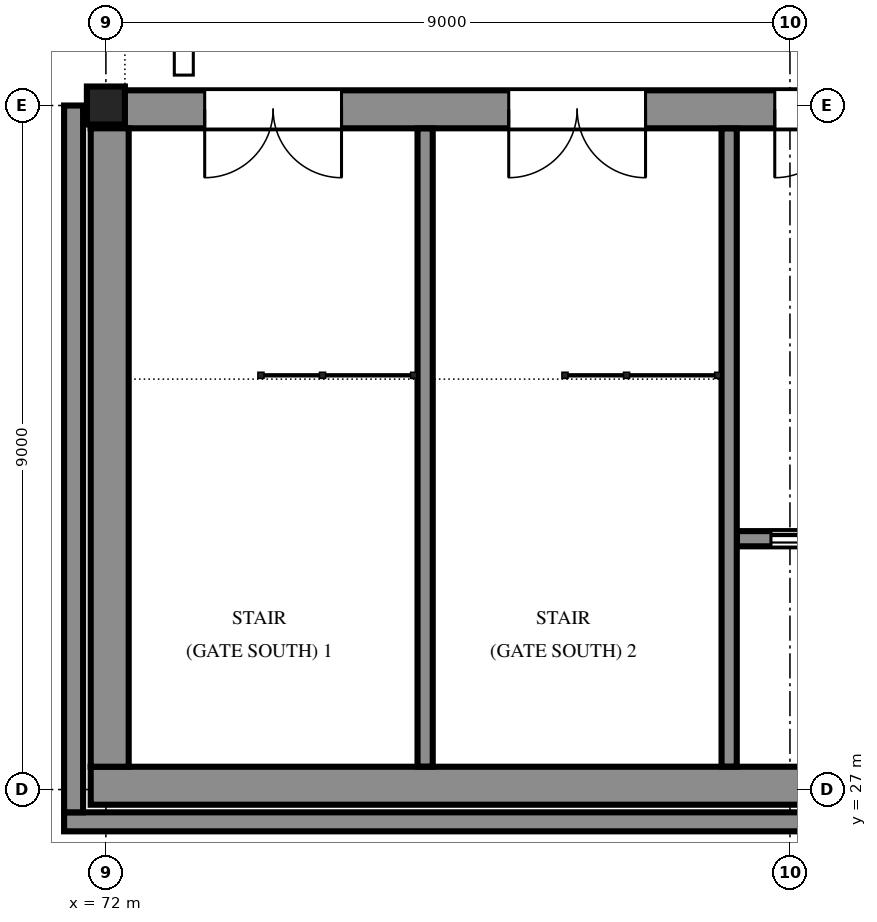
"""IFC4 building model, lengths in metres.
Left out: names, types, materials, properties, quantities, classifications, styles, units other than length and angle.
Written with IfcOpenShell. Run it as: python <this file> out.ifc"""

import sys

from ifc_helpers import new_model, si_unit, direction, frame, frame_2d, origin, origin_2d, place, context, subcontext, project, spatial, polyline, rectangle, hollow_rectangle, outline, extrude, element, fill, save


model = new_model("IFC4")
c1 = context("Model", 3, precision=1e-05, world=origin(), true_north=direction((0.0, 1.0)))
c2 = subcontext(c1, "Body", "Model", "MODEL_VIEW")
j1 = project(units=[si_unit("LENGTHUNIT", "METRE"), si_unit("PLANEANGLEUNIT", "RADIAN")], contexts=[c1])
p1 = place(None, origin())
s1 = spatial("IfcSite", under=j1, at=p1, CompositionType="ELEMENT")
p2 = place(p1, origin())
s2 = spatial("IfcBuilding", under=s1, at=p2, CompositionType="ELEMENT")
p3 = place(p2, frame((0.0, 0.0, 20.1)))
s3 = spatial("IfcBuildingStorey", under=s2, at=p3, CompositionType="ELEMENT", Elevation=20.1)
p4 = place(p3, frame((72.0, 36.0, 0.0), z_axis=(0.0, 0.0, 1.0), x_axis=(1.0, 0.0, 0.0)))
e1 = element("IfcColumn", 1, at=p4, inside=s3, PredefinedType="COLUMN", context=c2, shape_type="SweptSolid", body=[
    extrude(hollow_rectangle(XDim=0.5, YDim=0.5, WallThickness=0.032, at=origin_2d()), origin(), (0.0, 0.0, 1.0), 4.2),
])
p5 = place(p3, frame((71.8, 27.05, 0.0), z_axis=(0.0, 0.0, 1.0), x_axis=(1.0, 0.0, 0.0)))
e2 = element("IfcWall", 2, at=p5, inside=s3, PredefinedType="SOLIDWALL", context=c2, shape_type="SweptSolid", body=[
    extrude(rectangle(XDim=18.4, YDim=0.5, at=frame_2d((9.2, 0.0))), origin(), (0.0, 0.0, 1.0), 4.2),
])
p6 = place(p3, frame((71.8, 35.95, 0.0), z_axis=(0.0, 0.0, 1.0), x_axis=(1.0, 0.0, 0.0)))
e3 = element("IfcWall", 3, at=p6, inside=s3, PredefinedType="SOLIDWALL", context=c2, shape_type="SweptSolid", body=[
    extrude(rectangle(XDim=18.4, YDim=0.5, at=frame_2d((9.2, 0.0))), origin(), (0.0, 0.0, 1.0), 4.2),
])
p7 = place(p6, frame((1.5, 0.0, 0.0)))
e4 = element("IfcOpeningElement", 4, at=p7, cuts=e3, PredefinedType="OPENING", context=c2, shape_type="SweptSolid", body=[
    extrude(rectangle(XDim=1.8, YDim=2.1, at=frame_2d((0.9, 1.05))), frame((0.0, 0.26, 0.0), z_axis=(0.0, -1.0, 0.0), x_axis=(1.0, 0.0, 0.0)), (0.0, 0.0, 1.0), 0.52),
])
p8 = place(p6, frame((5.5, 0.0, 0.0)))
e5 = element("IfcOpeningElement", 5, at=p8, cuts=e3, PredefinedType="OPENING", context=c2, shape_type="SweptSolid", body=[
    extrude(rectangle(XDim=1.8, YDim=2.1, at=frame_2d((0.9, 1.05))), frame((0.0, 0.26, 0.0), z_axis=(0.0, -1.0, 0.0), x_axis=(1.0, 0.0, 0.0)), (0.0, 0.0, 1.0), 0.52),
])
p9 = place(p6, frame((9.0, 0.0, 0.0)))
e6 = element("IfcOpeningElement", 6, at=p9, cuts=e3, PredefinedType="OPENING", context=c2, shape_type="SweptSolid", body=[
    extrude(rectangle(XDim=1.8, YDim=2.1, at=frame_2d((0.9, 1.05))), frame((0.0, 0.26, 0.0), z_axis=(0.0, -1.0, 0.0), x_axis=(1.0, 0.0, 0.0)), (0.0, 0.0, 1.0), 0.52),
])
p10 = place(p6, frame((16.15, 0.0, 0.0)))
e7 = element("IfcOpeningElement", 7, at=p10, cuts=e3, PredefinedType="OPENING", context=c2, shape_type="SweptSolid", body=[
    extrude(rectangle(XDim=0.9, YDim=2.1, at=frame_2d((0.45, 1.05))), frame((0.0, 0.26, 0.0), z_axis=(0.0, -1.0, 0.0), x_axis=(1.0, 0.0, 0.0)), (0.0, 0.0, 1.0), 0.52),
])
p11 = place(p3, frame((72.05, 27.3, 0.0), z_axis=(0.0, 0.0, 1.0), x_axis=(0.0, 1.0, 0.0)))
e8 = element("IfcWall", 8, at=p11, inside=s3, PredefinedType="SOLIDWALL", context=c2, shape_type="SweptSolid", body=[
    extrude(rectangle(XDim=8.4, YDim=0.5, at=frame_2d((4.2, 0.0))), origin(), (0.0, 0.0, 1.0), 4.2),
])
for number, where, z_axis, x_axis in (
    (9, (76.2, 27.302, -0.15), (0.0, 0.0, 1.0), (0.0, 1.0, 0.0)),
    (10, (80.2, 27.302, -0.15), (0.0, 0.0, 1.0), (0.0, 1.0, 0.0)),
):
    element("IfcWall", number, at=place(p3, frame(where, z_axis=z_axis, x_axis=x_axis)), inside=s3, PredefinedType="SOLIDWALL", context=c2, shape_type="SweptSolid", body=[
        extrude(rectangle(XDim=8.396, YDim=0.2, at=frame_2d((4.198, 0.0))), origin(), (0.0, 0.0, 1.0), 3.666),
    ])
p12 = place(p3, frame((80.302, 30.3, 0.0), z_axis=(0.0, 0.0, 1.0), x_axis=(1.0, 0.0, 0.0)))
e11 = element("IfcWall", 11, at=p12, inside=s3, PredefinedType="SOLIDWALL", context=c2, shape_type="SweptSolid", body=[
    extrude(rectangle(XDim=2.198, YDim=0.2, at=frame_2d((1.099, 0.0))), origin(), (0.0, 0.0, 1.0), 3.516),
])
p13 = place(p12, frame((0.448, 0.0, 0.0)))
e12 = element("IfcOpeningElement", 12, at=p13, cuts=e11, PredefinedType="OPENING", context=c2, shape_type="SweptSolid", body=[
    extrude(rectangle(XDim=1.1, YDim=2.1, at=frame_2d((0.55, 1.05))), frame((0.0, 0.11, 0.0), z_axis=(0.0, -1.0, 0.0), x_axis=(1.0, 0.0, 0.0)), (0.0, 0.0, 1.0), 0.22),
])
p14 = place(p13, origin())
e13 = element("IfcDoor", 13, at=p14, inside=s3, OperationType="SLIDING_TO_LEFT", PredefinedType="DOOR", context=c2, shape_type="SweptSolid", body=[
    extrude(outline(polyline([(0.0, 0.0), (0.07, 0.0), (0.07, 2.03), (1.03, 2.03), (1.03, 0.0), (1.1, 0.0), (1.1, 2.1), (0.0, 2.1), (0.0, 0.0)])), frame((0.0, 0.025, 0.0), z_axis=(0.0, -1.0, 0.0), x_axis=(1.0, 0.0, 0.0)), (0.0, 0.0, 1.0), 0.05),
    extrude(rectangle(XDim=0.524, YDim=2.016, at=frame_2d((0.336, 1.018))), frame((0.0, 0.018, 0.0), z_axis=(0.0, -1.0, 0.0), x_axis=(1.0, 0.0, 0.0)), (0.0, 0.0, 1.0), 0.016),
    extrude(rectangle(XDim=0.52, YDim=2.016, at=frame_2d((0.766, 1.018))), frame((0.0, -0.002, 0.0), z_axis=(0.0, -1.0, 0.0), x_axis=(1.0, 0.0, 0.0)), (0.0, 0.0, 1.0), 0.016),
])
fill(e12, e13)
p15 = place(p7, frame((1.8, 0.0, 0.0), z_axis=(0.0, 0.0, 1.0), x_axis=(-1.0, 0.0, 0.0)))
e14 = element("IfcDoor", 14, at=p15, inside=s3, OperationType="DOUBLE_DOOR_SINGLE_SWING", PredefinedType="DOOR", context=c2, shape_type="SweptSolid", body=[
    extrude(outline(polyline([(0.0, 0.0), (0.07, 0.0), (0.07, 2.03), (1.73, 2.03), (1.73, 0.0), (1.8, 0.0), (1.8, 2.1), (0.0, 2.1), (0.0, 0.0)])), frame((0.0, 0.025, 0.0), z_axis=(0.0, -1.0, 0.0), x_axis=(1.0, 0.0, 0.0)), (0.0, 0.0, 1.0), 0.05),
    extrude(outline(polyline([(0.074, 0.01), (0.897, 0.01), (0.897, 2.026), (0.074, 2.026), (0.074, 0.01)]), holes=[polyline([(0.194, 0.16), (0.777, 0.16), (0.777, 1.01), (0.194, 1.01), (0.194, 0.16)]), polyline([(0.335, 1.16), (0.635, 1.16), (0.635, 1.76), (0.335, 1.76), (0.335, 1.16)])]), frame((0.0, 0.017, 0.0), z_axis=(0.0, -1.0, 0.0), x_axis=(1.0, 0.0, 0.0)), (0.0, 0.0, 1.0), 0.035),
    extrude(rectangle(XDim=0.583, YDim=0.85, at=frame_2d((0.485, 0.585))), frame((0.0, 0.009, 0.0), z_axis=(0.0, -1.0, 0.0), x_axis=(1.0, 0.0, 0.0)), (0.0, 0.0, 1.0), 0.017),
    extrude(rectangle(XDim=0.3, YDim=0.6, at=frame_2d((0.485, 1.46))), frame((0.0, 0.006, 0.0), z_axis=(0.0, -1.0, 0.0), x_axis=(1.0, 0.0, 0.0)), (0.0, 0.0, 1.0), 0.012),
    extrude(outline(polyline([(0.903, 0.01), (1.726, 0.01), (1.726, 2.026), (0.903, 2.026), (0.903, 0.01)]), holes=[polyline([(1.023, 0.16), (1.606, 0.16), (1.606, 1.01), (1.023, 1.01), (1.023, 0.16)]), polyline([(1.165, 1.16), (1.465, 1.16), (1.465, 1.76), (1.165, 1.76), (1.165, 1.16)])]), frame((0.0, 0.017, 0.0), z_axis=(0.0, -1.0, 0.0), x_axis=(1.0, 0.0, 0.0)), (0.0, 0.0, 1.0), 0.035),
    extrude(rectangle(XDim=0.583, YDim=0.85, at=frame_2d((1.314, 0.585))), frame((0.0, 0.009, 0.0), z_axis=(0.0, -1.0, 0.0), x_axis=(1.0, 0.0, 0.0)), (0.0, 0.0, 1.0), 0.017),
    extrude(rectangle(XDim=0.3, YDim=0.6, at=frame_2d((1.314, 1.46))), frame((0.0, 0.006, 0.0), z_axis=(0.0, -1.0, 0.0), x_axis=(1.0, 0.0, 0.0)), (0.0, 0.0, 1.0), 0.012),
])
fill(e4, e14)
p16 = place(p8, frame((1.8, 0.0, 0.0), z_axis=(0.0, 0.0, 1.0), x_axis=(-1.0, 0.0, 0.0)))
e15 = element("IfcDoor", 15, at=p16, inside=s3, OperationType="DOUBLE_DOOR_SINGLE_SWING", PredefinedType="DOOR", context=c2, shape_type="SweptSolid", body=[
    extrude(outline(polyline([(0.0, 0.0), (0.07, 0.0), (0.07, 2.03), (1.73, 2.03), (1.73, 0.0), (1.8, 0.0), (1.8, 2.1), (0.0, 2.1), (0.0, 0.0)])), frame((0.0, 0.025, 0.0), z_axis=(0.0, -1.0, 0.0), x_axis=(1.0, 0.0, 0.0)), (0.0, 0.0, 1.0), 0.05),
    extrude(outline(polyline([(0.074, 0.01), (0.897, 0.01), (0.897, 2.026), (0.074, 2.026), (0.074, 0.01)]), holes=[polyline([(0.194, 0.16), (0.777, 0.16), (0.777, 1.01), (0.194, 1.01), (0.194, 0.16)]), polyline([(0.335, 1.16), (0.635, 1.16), (0.635, 1.76), (0.335, 1.76), (0.335, 1.16)])]), frame((0.0, 0.017, 0.0), z_axis=(0.0, -1.0, 0.0), x_axis=(1.0, 0.0, 0.0)), (0.0, 0.0, 1.0), 0.035),
    extrude(rectangle(XDim=0.583, YDim=0.85, at=frame_2d((0.485, 0.585))), frame((0.0, 0.009, 0.0), z_axis=(0.0, -1.0, 0.0), x_axis=(1.0, 0.0, 0.0)), (0.0, 0.0, 1.0), 0.017),
    extrude(rectangle(XDim=0.3, YDim=0.6, at=frame_2d((0.485, 1.46))), frame((0.0, 0.006, 0.0), z_axis=(0.0, -1.0, 0.0), x_axis=(1.0, 0.0, 0.0)), (0.0, 0.0, 1.0), 0.012),
    extrude(outline(polyline([(0.903, 0.01), (1.726, 0.01), (1.726, 2.026), (0.903, 2.026), (0.903, 0.01)]), holes=[polyline([(1.023, 0.16), (1.606, 0.16), (1.606, 1.01), (1.023, 1.01), (1.023, 0.16)]), polyline([(1.165, 1.16), (1.465, 1.16), (1.465, 1.76), (1.165, 1.76), (1.165, 1.16)])]), frame((0.0, 0.017, 0.0), z_axis=(0.0, -1.0, 0.0), x_axis=(1.0, 0.0, 0.0)), (0.0, 0.0, 1.0), 0.035),
    extrude(rectangle(XDim=0.583, YDim=0.85, at=frame_2d((1.314, 0.585))), frame((0.0, 0.009, 0.0), z_axis=(0.0, -1.0, 0.0), x_axis=(1.0, 0.0, 0.0)), (0.0, 0.0, 1.0), 0.017),
    extrude(rectangle(XDim=0.3, YDim=0.6, at=frame_2d((1.314, 1.46))), frame((0.0, 0.006, 0.0), z_axis=(0.0, -1.0, 0.0), x_axis=(1.0, 0.0, 0.0)), (0.0, 0.0, 1.0), 0.012),
])
fill(e5, e15)
p17 = place(p9, frame((1.8, 0.0, 0.0), z_axis=(0.0, 0.0, 1.0), x_axis=(-1.0, 0.0, 0.0)))
e16 = element("IfcDoor", 16, at=p17, inside=s3, OperationType="DOUBLE_DOOR_SINGLE_SWING", PredefinedType="DOOR", context=c2, shape_type="SweptSolid", body=[
    extrude(outline(polyline([(0.0, 0.0), (0.07, 0.0), (0.07, 2.03), (1.73, 2.03), (1.73, 0.0), (1.8, 0.0), (1.8, 2.1), (0.0, 2.1), (0.0, 0.0)])), frame((0.0, 0.025, 0.0), z_axis=(0.0, -1.0, 0.0), x_axis=(1.0, 0.0, 0.0)), (0.0, 0.0, 1.0), 0.05),
    extrude(outline(polyline([(0.074, 0.01), (0.897, 0.01), (0.897, 2.026), (0.074, 2.026), (0.074, 0.01)]), holes=[polyline([(0.194, 0.16), (0.777, 0.16), (0.777, 1.01), (0.194, 1.01), (0.194, 0.16)]), polyline([(0.335, 1.16), (0.635, 1.16), (0.635, 1.76), (0.335, 1.76), (0.335, 1.16)])]), frame((0.0, 0.017, 0.0), z_axis=(0.0, -1.0, 0.0), x_axis=(1.0, 0.0, 0.0)), (0.0, 0.0, 1.0), 0.035),
    extrude(rectangle(XDim=0.583, YDim=0.85, at=frame_2d((0.485, 0.585))), frame((0.0, 0.009, 0.0), z_axis=(0.0, -1.0, 0.0), x_axis=(1.0, 0.0, 0.0)), (0.0, 0.0, 1.0), 0.017),
    extrude(rectangle(XDim=0.3, YDim=0.6, at=frame_2d((0.485, 1.46))), frame((0.0, 0.006, 0.0), z_axis=(0.0, -1.0, 0.0), x_axis=(1.0, 0.0, 0.0)), (0.0, 0.0, 1.0), 0.012),
    extrude(outline(polyline([(0.903, 0.01), (1.726, 0.01), (1.726, 2.026), (0.903, 2.026), (0.903, 0.01)]), holes=[polyline([(1.023, 0.16), (1.606, 0.16), (1.606, 1.01), (1.023, 1.01), (1.023, 0.16)]), polyline([(1.165, 1.16), (1.465, 1.16), (1.465, 1.76), (1.165, 1.76), (1.165, 1.16)])]), frame((0.0, 0.017, 0.0), z_axis=(0.0, -1.0, 0.0), x_axis=(1.0, 0.0, 0.0)), (0.0, 0.0, 1.0), 0.035),
    extrude(rectangle(XDim=0.583, YDim=0.85, at=frame_2d((1.314, 0.585))), frame((0.0, 0.009, 0.0), z_axis=(0.0, -1.0, 0.0), x_axis=(1.0, 0.0, 0.0)), (0.0, 0.0, 1.0), 0.017),
    extrude(rectangle(XDim=0.3, YDim=0.6, at=frame_2d((1.314, 1.46))), frame((0.0, 0.006, 0.0), z_axis=(0.0, -1.0, 0.0), x_axis=(1.0, 0.0, 0.0)), (0.0, 0.0, 1.0), 0.012),
])
fill(e6, e16)
save(model, sys.argv[1])
